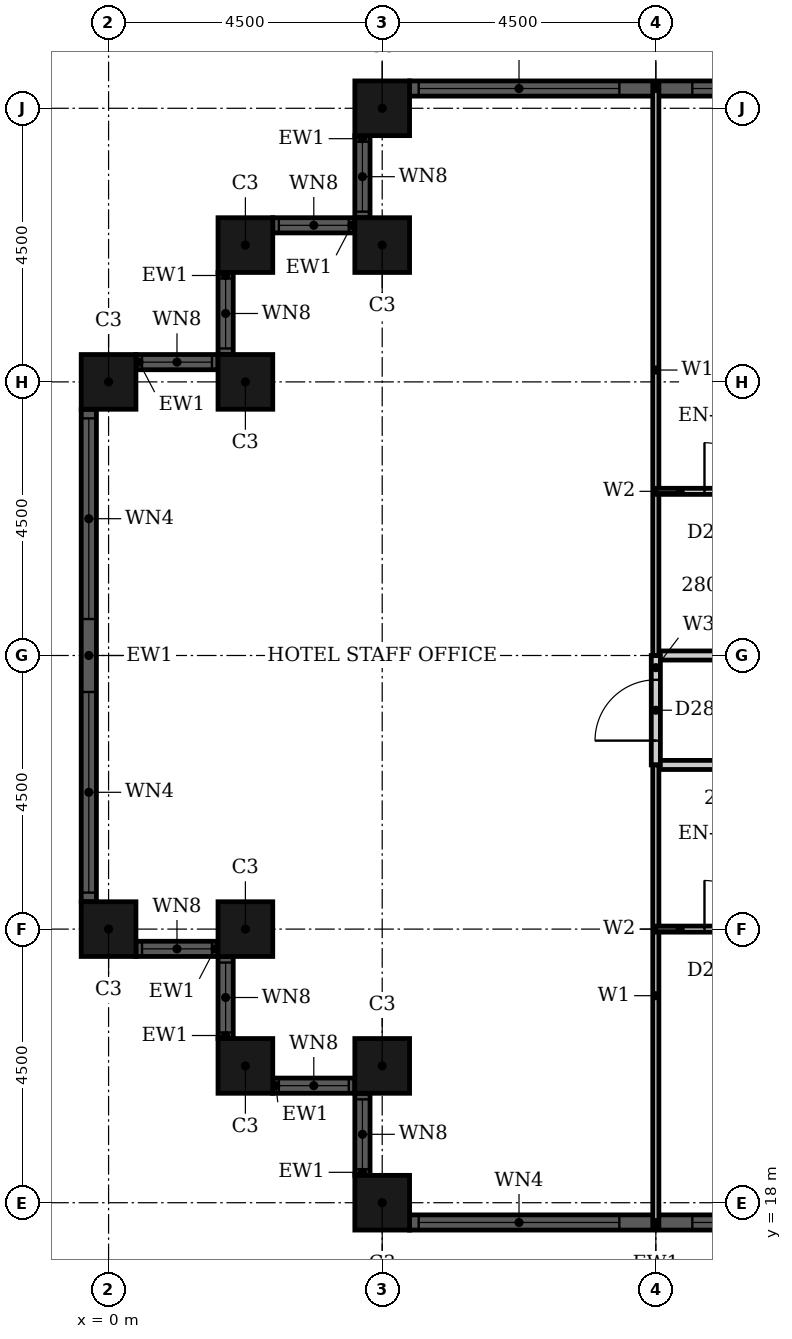
"""IFC4 building model, lengths in metres.
Left out: names, types, materials, properties, quantities, classifications, styles, units other than length and angle.
Written with IfcOpenShell. Run it as: python <this file> out.ifc"""

import sys

from ifc_helpers import new_model, si_unit, direction, frame, frame_2d, origin, origin_2d, place, context, subcontext, project, spatial, rectangle, hollow_rectangle, extrude, element, fill, save


model = new_model("IFC4")
c1 = context("Model", 3, precision=1e-05, world=origin(), true_north=direction((0.0, 1.0)))
c2 = subcontext(c1, "Body", "Model", "MODEL_VIEW")
j1 = project(units=[si_unit("LENGTHUNIT", "METRE"), si_unit("PLANEANGLEUNIT", "RADIAN")], contexts=[c1])
p1 = place(None, origin())
s1 = spatial("IfcSite", under=j1, at=p1, CompositionType="ELEMENT")
p2 = place(p1, origin())
s2 = spatial("IfcBuilding", under=s1, at=p2, CompositionType="ELEMENT")
p3 = place(p2, frame((0.0, 0.0, 115.2)))
s3 = spatial("IfcBuildingStorey", under=s2, at=p3, CompositionType="ELEMENT", Elevation=115.2)
for number, where, z_axis, x_axis in (
    (1, (4.5, 36.0, 0.0), (0.0, 0.0, 1.0), (1.0, 0.0, 0.0)),
    (2, (4.5, 33.75, 0.0), (0.0, 0.0, 1.0), (1.0, 0.0, 0.0)),
    (3, (2.25, 33.75, 0.0), (0.0, 0.0, 1.0), (1.0, 0.0, 0.0)),
    (4, (2.25, 31.5, 0.0), (0.0, 0.0, 1.0), (1.0, 0.0, 0.0)),
    (5, (0.0, 31.5, 0.0), (0.0, 0.0, 1.0), (1.0, 0.0, 0.0)),
    (6, (0.0, 22.5, 0.0), (0.0, 0.0, 1.0), (1.0, 0.0, 0.0)),
    (7, (2.25, 22.5, 0.0), (0.0, 0.0, 1.0), (1.0, 0.0, 0.0)),
    (8, (2.25, 20.25, 0.0), (0.0, 0.0, 1.0), (1.0, 0.0, 0.0)),
    (9, (4.5, 20.25, 0.0), (0.0, 0.0, 1.0), (1.0, 0.0, 0.0)),
    (10, (4.5, 18.0, 0.0), (0.0, 0.0, 1.0), (1.0, 0.0, 0.0)),
):
    element("IfcColumn", number, at=place(p3, frame(where, z_axis=z_axis, x_axis=x_axis)), inside=s3, PredefinedType="COLUMN", context=c2, shape_type="SweptSolid", body=[
        extrude(hollow_rectangle(XDim=0.9, YDim=0.9, WallThickness=0.028, at=origin_2d()), origin(), (0.0, 0.0, 1.0), 3.6),
    ])
p4 = place(p3, frame((13.05, 36.325, 0.0), z_axis=(0.0, 0.0, 1.0), x_axis=(-1.0, 0.0, 0.0)))
e11 = element("IfcWall", 11, at=p4, inside=s3, PredefinedType="SOLIDWALL", context=c2, shape_type="SweptSolid", body=[
    extrude(rectangle(XDim=8.1, YDim=0.25, at=frame_2d((4.05, 0.0))), origin(), (0.0, 0.0, 1.0), 3.6),
])
p5 = place(p4, frame((0.15, 0.0, 0.9)))
e12 = element("IfcOpeningElement", 12, at=p5, cuts=e11, PredefinedType="OPENING", context=c2, shape_type="SweptSolid", body=[
    extrude(rectangle(XDim=3.3, YDim=2.08, at=frame_2d((1.65, 1.04))), frame((0.0, 0.135, 0.0), z_axis=(0.0, -1.0, 0.0), x_axis=(1.0, 0.0, 0.0)), (0.0, 0.0, 1.0), 0.27),
])
p6 = place(p4, frame((4.65, 0.0, 0.9)))
e13 = element("IfcOpeningElement", 13, at=p6, cuts=e11, PredefinedType="OPENING", context=c2, shape_type="SweptSolid", body=[
    extrude(rectangle(XDim=3.3, YDim=2.08, at=frame_2d((1.65, 1.04))), frame((0.0, 0.135, 0.0), z_axis=(0.0, -1.0, 0.0), x_axis=(1.0, 0.0, 0.0)), (0.0, 0.0, 1.0), 0.27),
])
p7 = place(p3, frame((4.175, 35.55, 0.0), z_axis=(0.0, 0.0, 1.0), x_axis=(0.0, -1.0, 0.0)))
e14 = element("IfcWall", 14, at=p7, inside=s3, PredefinedType="SOLIDWALL", context=c2, shape_type="SweptSolid", body=[
    extrude(rectangle(XDim=1.35, YDim=0.25, at=frame_2d((0.675, 0.0))), origin(), (0.0, 0.0, 1.0), 3.6),
])
p8 = place(p7, frame((0.1, 0.0, 0.9)))
e15 = element("IfcOpeningElement", 15, at=p8, cuts=e14, PredefinedType="OPENING", context=c2, shape_type="SweptSolid", body=[
    extrude(rectangle(XDim=1.15, YDim=2.08, at=frame_2d((0.575, 1.04))), frame((0.0, 0.135, 0.0), z_axis=(0.0, -1.0, 0.0), x_axis=(1.0, 0.0, 0.0)), (0.0, 0.0, 1.0), 0.27),
])
p9 = place(p3, frame((4.05, 34.075, 0.0), z_axis=(0.0, 0.0, 1.0), x_axis=(-1.0, 0.0, 0.0)))
e16 = element("IfcWall", 16, at=p9, inside=s3, PredefinedType="SOLIDWALL", context=c2, shape_type="SweptSolid", body=[
    extrude(rectangle(XDim=1.35, YDim=0.25, at=frame_2d((0.675, 0.0))), origin(), (0.0, 0.0, 1.0), 3.6),
])
p10 = place(p9, frame((0.1, 0.0, 0.9)))
e17 = element("IfcOpeningElement", 17, at=p10, cuts=e16, PredefinedType="OPENING", context=c2, shape_type="SweptSolid", body=[
    extrude(rectangle(XDim=1.15, YDim=2.08, at=frame_2d((0.575, 1.04))), frame((0.0, 0.135, 0.0), z_axis=(0.0, -1.0, 0.0), x_axis=(1.0, 0.0, 0.0)), (0.0, 0.0, 1.0), 0.27),
])
p11 = place(p3, frame((1.925, 33.3, 0.0), z_axis=(0.0, 0.0, 1.0), x_axis=(0.0, -1.0, 0.0)))
e18 = element("IfcWall", 18, at=p11, inside=s3, PredefinedType="SOLIDWALL", context=c2, shape_type="SweptSolid", body=[
    extrude(rectangle(XDim=1.35, YDim=0.25, at=frame_2d((0.675, 0.0))), origin(), (0.0, 0.0, 1.0), 3.6),
])
p12 = place(p11, frame((0.1, 0.0, 0.9)))
e19 = element("IfcOpeningElement", 19, at=p12, cuts=e18, PredefinedType="OPENING", context=c2, shape_type="SweptSolid", body=[
    extrude(rectangle(XDim=1.15, YDim=2.08, at=frame_2d((0.575, 1.04))), frame((0.0, 0.135, 0.0), z_axis=(0.0, -1.0, 0.0), x_axis=(1.0, 0.0, 0.0)), (0.0, 0.0, 1.0), 0.27),
])
p13 = place(p3, frame((1.8, 31.825, 0.0), z_axis=(0.0, 0.0, 1.0), x_axis=(-1.0, 0.0, 0.0)))
e20 = element("IfcWall", 20, at=p13, inside=s3, PredefinedType="SOLIDWALL", context=c2, shape_type="SweptSolid", body=[
    extrude(rectangle(XDim=1.35, YDim=0.25, at=frame_2d((0.675, 0.0))), origin(), (0.0, 0.0, 1.0), 3.6),
])
p14 = place(p13, frame((0.1, 0.0, 0.9)))
e21 = element("IfcOpeningElement", 21, at=p14, cuts=e20, PredefinedType="OPENING", context=c2, shape_type="SweptSolid", body=[
    extrude(rectangle(XDim=1.15, YDim=2.08, at=frame_2d((0.575, 1.04))), frame((0.0, 0.135, 0.0), z_axis=(0.0, -1.0, 0.0), x_axis=(1.0, 0.0, 0.0)), (0.0, 0.0, 1.0), 0.27),
])
p15 = place(p3, frame((-0.325, 31.05, 0.0), z_axis=(0.0, 0.0, 1.0), x_axis=(0.0, -1.0, 0.0)))
e22 = element("IfcWall", 22, at=p15, inside=s3, PredefinedType="SOLIDWALL", context=c2, shape_type="SweptSolid", body=[
    extrude(rectangle(XDim=8.1, YDim=0.25, at=frame_2d((4.05, 0.0))), origin(), (0.0, 0.0, 1.0), 3.6),
])
p16 = place(p15, frame((0.15, 0.0, 0.9)))
e23 = element("IfcOpeningElement", 23, at=p16, cuts=e22, PredefinedType="OPENING", context=c2, shape_type="SweptSolid", body=[
    extrude(rectangle(XDim=3.3, YDim=2.08, at=frame_2d((1.65, 1.04))), frame((0.0, 0.135, 0.0), z_axis=(0.0, -1.0, 0.0), x_axis=(1.0, 0.0, 0.0)), (0.0, 0.0, 1.0), 0.27),
])
p17 = place(p15, frame((4.65, 0.0, 0.9)))
e24 = element("IfcOpeningElement", 24, at=p17, cuts=e22, PredefinedType="OPENING", context=c2, shape_type="SweptSolid", body=[
    extrude(rectangle(XDim=3.3, YDim=2.08, at=frame_2d((1.65, 1.04))), frame((0.0, 0.135, 0.0), z_axis=(0.0, -1.0, 0.0), x_axis=(1.0, 0.0, 0.0)), (0.0, 0.0, 1.0), 0.27),
])
p18 = place(p3, frame((0.45, 22.175, 0.0), z_axis=(0.0, 0.0, 1.0), x_axis=(1.0, 0.0, 0.0)))
e25 = element("IfcWall", 25, at=p18, inside=s3, PredefinedType="SOLIDWALL", context=c2, shape_type="SweptSolid", body=[
    extrude(rectangle(XDim=1.35, YDim=0.25, at=frame_2d((0.675, 0.0))), origin(), (0.0, 0.0, 1.0), 3.6),
])
p19 = place(p18, frame((0.1, 0.0, 0.9)))
e26 = element("IfcOpeningElement", 26, at=p19, cuts=e25, PredefinedType="OPENING", context=c2, shape_type="SweptSolid", body=[
    extrude(rectangle(XDim=1.15, YDim=2.08, at=frame_2d((0.575, 1.04))), frame((0.0, 0.135, 0.0), z_axis=(0.0, -1.0, 0.0), x_axis=(1.0, 0.0, 0.0)), (0.0, 0.0, 1.0), 0.27),
])
p20 = place(p3, frame((1.925, 22.05, 0.0), z_axis=(0.0, 0.0, 1.0), x_axis=(0.0, -1.0, 0.0)))
e27 = element("IfcWall", 27, at=p20, inside=s3, PredefinedType="SOLIDWALL", context=c2, shape_type="SweptSolid", body=[
    extrude(rectangle(XDim=1.35, YDim=0.25, at=frame_2d((0.675, 0.0))), origin(), (0.0, 0.0, 1.0), 3.6),
])
p21 = place(p20, frame((0.1, 0.0, 0.9)))
e28 = element("IfcOpeningElement", 28, at=p21, cuts=e27, PredefinedType="OPENING", context=c2, shape_type="SweptSolid", body=[
    extrude(rectangle(XDim=1.15, YDim=2.08, at=frame_2d((0.575, 1.04))), frame((0.0, 0.135, 0.0), z_axis=(0.0, -1.0, 0.0), x_axis=(1.0, 0.0, 0.0)), (0.0, 0.0, 1.0), 0.27),
])
p22 = place(p3, frame((2.7, 19.925, 0.0), z_axis=(0.0, 0.0, 1.0), x_axis=(1.0, 0.0, 0.0)))
e29 = element("IfcWall", 29, at=p22, inside=s3, PredefinedType="SOLIDWALL", context=c2, shape_type="SweptSolid", body=[
    extrude(rectangle(XDim=1.35, YDim=0.25, at=frame_2d((0.675, 0.0))), origin(), (0.0, 0.0, 1.0), 3.6),
])
p23 = place(p22, frame((0.1, 0.0, 0.9)))
e30 = element("IfcOpeningElement", 30, at=p23, cuts=e29, PredefinedType="OPENING", context=c2, shape_type="SweptSolid", body=[
    extrude(rectangle(XDim=1.15, YDim=2.08, at=frame_2d((0.575, 1.04))), frame((0.0, 0.135, 0.0), z_axis=(0.0, -1.0, 0.0), x_axis=(1.0, 0.0, 0.0)), (0.0, 0.0, 1.0), 0.27),
])
p24 = place(p3, frame((4.175, 19.8, 0.0), z_axis=(0.0, 0.0, 1.0), x_axis=(0.0, -1.0, 0.0)))
e31 = element("IfcWall", 31, at=p24, inside=s3, PredefinedType="SOLIDWALL", context=c2, shape_type="SweptSolid", body=[
    extrude(rectangle(XDim=1.35, YDim=0.25, at=frame_2d((0.675, 0.0))), origin(), (0.0, 0.0, 1.0), 3.6),
])
p25 = place(p24, frame((0.1, 0.0, 0.9)))
e32 = element("IfcOpeningElement", 32, at=p25, cuts=e31, PredefinedType="OPENING", context=c2, shape_type="SweptSolid", body=[
    extrude(rectangle(XDim=1.15, YDim=2.08, at=frame_2d((0.575, 1.04))), frame((0.0, 0.135, 0.0), z_axis=(0.0, -1.0, 0.0), x_axis=(1.0, 0.0, 0.0)), (0.0, 0.0, 1.0), 0.27),
])
p26 = place(p3, frame((4.95, 17.675, 0.0), z_axis=(0.0, 0.0, 1.0), x_axis=(1.0, 0.0, 0.0)))
e33 = element("IfcWall", 33, at=p26, inside=s3, PredefinedType="SOLIDWALL", context=c2, shape_type="SweptSolid", body=[
    extrude(rectangle(XDim=8.1, YDim=0.25, at=frame_2d((4.05, 0.0))), origin(), (0.0, 0.0, 1.0), 3.6),
])
p27 = place(p26, frame((0.15, 0.0, 0.9)))
e34 = element("IfcOpeningElement", 34, at=p27, cuts=e33, PredefinedType="OPENING", context=c2, shape_type="SweptSolid", body=[
    extrude(rectangle(XDim=3.3, YDim=2.08, at=frame_2d((1.65, 1.04))), frame((0.0, 0.135, 0.0), z_axis=(0.0, -1.0, 0.0), x_axis=(1.0, 0.0, 0.0)), (0.0, 0.0, 1.0), 0.27),
])
p28 = place(p26, frame((4.65, 0.0, 0.9)))
e35 = element("IfcOpeningElement", 35, at=p28, cuts=e33, PredefinedType="OPENING", context=c2, shape_type="SweptSolid", body=[
    extrude(rectangle(XDim=3.3, YDim=2.08, at=frame_2d((1.65, 1.04))), frame((0.0, 0.135, 0.0), z_axis=(0.0, -1.0, 0.0), x_axis=(1.0, 0.0, 0.0)), (0.0, 0.0, 1.0), 0.27),
])
p29 = place(p3, frame((9.0, 25.2, 0.0), z_axis=(0.0, 0.0, 1.0), x_axis=(1.0, 0.0, 0.0)))
e36 = element("IfcWall", 36, at=p29, inside=s3, PredefinedType="PARTITIONING", context=c2, shape_type="SweptSolid", body=[
    extrude(rectangle(XDim=7.2, YDim=0.15, at=frame_2d((3.6, 0.0))), origin(), (0.0, 0.0, 1.0), 3.3),
])
p30 = place(p29, frame((2.95, 0.0, 0.0)))
e37 = element("IfcOpeningElement", 37, at=p30, cuts=e36, PredefinedType="OPENING", context=c2, shape_type="SweptSolid", body=[
    extrude(rectangle(XDim=1.0, YDim=2.1, at=frame_2d((0.5, 1.05))), frame((0.0, 0.085, 0.0), z_axis=(0.0, -1.0, 0.0), x_axis=(1.0, 0.0, 0.0)), (0.0, 0.0, 1.0), 0.17),
])
p31 = place(p3, frame((9.0, 27.0, 0.0), z_axis=(0.0, 0.0, 1.0), x_axis=(1.0, 0.0, 0.0)))
e38 = element("IfcWall", 38, at=p31, inside=s3, PredefinedType="PARTITIONING", context=c2, shape_type="SweptSolid", body=[
    extrude(rectangle(XDim=7.2, YDim=0.15, at=frame_2d((3.6, 0.0))), origin(), (0.0, 0.0, 1.0), 2.58),
])
p32 = place(p31, frame((2.95, 0.0, 0.0)))
e39 = element("IfcOpeningElement", 39, at=p32, cuts=e38, PredefinedType="OPENING", context=c2, shape_type="SweptSolid", body=[
    extrude(rectangle(XDim=1.0, YDim=2.1, at=frame_2d((0.5, 1.05))), frame((0.0, 0.085, 0.0), z_axis=(0.0, -1.0, 0.0), x_axis=(1.0, 0.0, 0.0)), (0.0, 0.0, 1.0), 0.17),
])
p33 = place(p3, frame((9.0, 25.2, 0.0), z_axis=(0.0, 0.0, 1.0), x_axis=(0.0, 1.0, 0.0)))
e40 = element("IfcWall", 40, at=p33, inside=s3, PredefinedType="PARTITIONING", context=c2, shape_type="SweptSolid", body=[
    extrude(rectangle(XDim=1.8, YDim=0.15, at=frame_2d((0.9, 0.0))), origin(), (0.0, 0.0, 1.0), 3.3),
])
p34 = place(p33, frame((0.4, 0.0, 0.0)))
e41 = element("IfcOpeningElement", 41, at=p34, cuts=e40, PredefinedType="OPENING", context=c2, shape_type="SweptSolid", body=[
    extrude(rectangle(XDim=1.0, YDim=2.1, at=frame_2d((0.5, 1.05))), frame((0.0, 0.085, 0.0), z_axis=(0.0, -1.0, 0.0), x_axis=(1.0, 0.0, 0.0)), (0.0, 0.0, 1.0), 0.17),
])
p35 = place(p3, frame((9.0, 27.0, 0.0), z_axis=(0.0, 0.0, 1.0), x_axis=(0.0, 1.0, 0.0)))
e42 = element("IfcWall", 42, at=p35, inside=s3, PredefinedType="PARTITIONING", context=c2, shape_type="SweptSolid", body=[
    extrude(rectangle(XDim=9.39, YDim=0.1, at=frame_2d((4.695, 0.0))), origin(), (0.0, 0.0, 1.0), 3.3),
])
p36 = place(p3, frame((9.0, 17.61, 0.0), z_axis=(0.0, 0.0, 1.0), x_axis=(0.0, 1.0, 0.0)))
e43 = element("IfcWall", 43, at=p36, inside=s3, PredefinedType="PARTITIONING", context=c2, shape_type="SweptSolid", body=[
    extrude(rectangle(XDim=7.59, YDim=0.1, at=frame_2d((3.795, 0.0))), origin(), (0.0, 0.0, 1.0), 3.3),
])
p37 = place(p3, frame((9.0, 22.5, 0.0), z_axis=(0.0, 0.0, 1.0), x_axis=(1.0, 0.0, 0.0)))
e44 = element("IfcWall", 44, at=p37, inside=s3, PredefinedType="PARTITIONING", context=c2, shape_type="SweptSolid", body=[
    extrude(rectangle(XDim=2.4, YDim=0.1, at=frame_2d((1.2, 0.0))), origin(), (0.0, 0.0, 1.0), 2.58),
])
p38 = place(p37, frame((0.8, 0.0, 0.0)))
e45 = element("IfcOpeningElement", 45, at=p38, cuts=e44, PredefinedType="OPENING", context=c2, shape_type="SweptSolid", body=[
    extrude(rectangle(XDim=0.8, YDim=2.1, at=frame_2d((0.4, 1.05))), frame((0.0, 0.06, 0.0), z_axis=(0.0, -1.0, 0.0), x_axis=(1.0, 0.0, 0.0)), (0.0, 0.0, 1.0), 0.12),
])
p39 = place(p3, frame((9.0, 29.7, 0.0), z_axis=(0.0, 0.0, 1.0), x_axis=(1.0, 0.0, 0.0)))
e46 = element("IfcWall", 46, at=p39, inside=s3, PredefinedType="PARTITIONING", context=c2, shape_type="SweptSolid", body=[
    extrude(rectangle(XDim=2.4, YDim=0.1, at=frame_2d((1.2, 0.0))), origin(), (0.0, 0.0, 1.0), 3.3),
])
p40 = place(p39, frame((0.8, 0.0, 0.0)))
e47 = element("IfcOpeningElement", 47, at=p40, cuts=e46, PredefinedType="OPENING", context=c2, shape_type="SweptSolid", body=[
    extrude(rectangle(XDim=0.8, YDim=2.1, at=frame_2d((0.4, 1.05))), frame((0.0, 0.06, 0.0), z_axis=(0.0, -1.0, 0.0), x_axis=(1.0, 0.0, 0.0)), (0.0, 0.0, 1.0), 0.12),
])
p41 = place(p5, origin())
e48 = element("IfcWindow", 48, at=p41, inside=s3, PartitioningType="SINGLE_PANEL", PredefinedType="WINDOW", context=c2, shape_type="SweptSolid", body=[
    extrude(rectangle(XDim=3.3, YDim=2.08, at=frame_2d((1.65, 1.04))), frame((0.0, 0.03, 0.0), z_axis=(0.0, -1.0, 0.0), x_axis=(1.0, 0.0, 0.0)), (0.0, 0.0, 1.0), 0.06),
])
fill(e12, e48)
p42 = place(p6, origin())
e49 = element("IfcWindow", 49, at=p42, inside=s3, PartitioningType="SINGLE_PANEL", PredefinedType="WINDOW", context=c2, shape_type="SweptSolid", body=[
    extrude(rectangle(XDim=3.3, YDim=2.08, at=frame_2d((1.65, 1.04))), frame((0.0, 0.03, 0.0), z_axis=(0.0, -1.0, 0.0), x_axis=(1.0, 0.0, 0.0)), (0.0, 0.0, 1.0), 0.06),
])
fill(e13, e49)
p43 = place(p8, origin())
e50 = element("IfcWindow", 50, at=p43, inside=s3, PartitioningType="SINGLE_PANEL", PredefinedType="WINDOW", context=c2, shape_type="SweptSolid", body=[
    extrude(rectangle(XDim=1.15, YDim=2.08, at=frame_2d((0.575, 1.04))), frame((0.0, 0.03, 0.0), z_axis=(0.0, -1.0, 0.0), x_axis=(1.0, 0.0, 0.0)), (0.0, 0.0, 1.0), 0.06),
])
fill(e15, e50)
p44 = place(p10, origin())
e51 = element("IfcWindow", 51, at=p44, inside=s3, PartitioningType="SINGLE_PANEL", PredefinedType="WINDOW", context=c2, shape_type="SweptSolid", body=[
    extrude(rectangle(XDim=1.15, YDim=2.08, at=frame_2d((0.575, 1.04))), frame((0.0, 0.03, 0.0), z_axis=(0.0, -1.0, 0.0), x_axis=(1.0, 0.0, 0.0)), (0.0, 0.0, 1.0), 0.06),
])
fill(e17, e51)
p45 = place(p12, origin())
e52 = element("IfcWindow", 52, at=p45, inside=s3, PartitioningType="SINGLE_PANEL", PredefinedType="WINDOW", context=c2, shape_type="SweptSolid", body=[
    extrude(rectangle(XDim=1.15, YDim=2.08, at=frame_2d((0.575, 1.04))), frame((0.0, 0.03, 0.0), z_axis=(0.0, -1.0, 0.0), x_axis=(1.0, 0.0, 0.0)), (0.0, 0.0, 1.0), 0.06),
])
fill(e19, e52)
p46 = place(p14, origin())
e53 = element("IfcWindow", 53, at=p46, inside=s3, PartitioningType="SINGLE_PANEL", PredefinedType="WINDOW", context=c2, shape_type="SweptSolid", body=[
    extrude(rectangle(XDim=1.15, YDim=2.08, at=frame_2d((0.575, 1.04))), frame((0.0, 0.03, 0.0), z_axis=(0.0, -1.0, 0.0), x_axis=(1.0, 0.0, 0.0)), (0.0, 0.0, 1.0), 0.06),
])
fill(e21, e53)
p47 = place(p16, origin())
e54 = element("IfcWindow", 54, at=p47, inside=s3, PartitioningType="SINGLE_PANEL", PredefinedType="WINDOW", context=c2, shape_type="SweptSolid", body=[
    extrude(rectangle(XDim=3.3, YDim=2.08, at=frame_2d((1.65, 1.04))), frame((0.0, 0.03, 0.0), z_axis=(0.0, -1.0, 0.0), x_axis=(1.0, 0.0, 0.0)), (0.0, 0.0, 1.0), 0.06),
])
fill(e23, e54)
p48 = place(p17, origin())
e55 = element("IfcWindow", 55, at=p48, inside=s3, PartitioningType="SINGLE_PANEL", PredefinedType="WINDOW", context=c2, shape_type="SweptSolid", body=[
    extrude(rectangle(XDim=3.3, YDim=2.08, at=frame_2d((1.65, 1.04))), frame((0.0, 0.03, 0.0), z_axis=(0.0, -1.0, 0.0), x_axis=(1.0, 0.0, 0.0)), (0.0, 0.0, 1.0), 0.06),
])
fill(e24, e55)
p49 = place(p19, origin())
e56 = element("IfcWindow", 56, at=p49, inside=s3, PartitioningType="SINGLE_PANEL", PredefinedType="WINDOW", context=c2, shape_type="SweptSolid", body=[
    extrude(rectangle(XDim=1.15, YDim=2.08, at=frame_2d((0.575, 1.04))), frame((0.0, 0.03, 0.0), z_axis=(0.0, -1.0, 0.0), x_axis=(1.0, 0.0, 0.0)), (0.0, 0.0, 1.0), 0.06),
])
fill(e26, e56)
p50 = place(p21, origin())
e57 = element("IfcWindow", 57, at=p50, inside=s3, PartitioningType="SINGLE_PANEL", PredefinedType="WINDOW", context=c2, shape_type="SweptSolid", body=[
    extrude(rectangle(XDim=1.15, YDim=2.08, at=frame_2d((0.575, 1.04))), frame((0.0, 0.03, 0.0), z_axis=(0.0, -1.0, 0.0), x_axis=(1.0, 0.0, 0.0)), (0.0, 0.0, 1.0), 0.06),
])
fill(e28, e57)
p51 = place(p23, origin())
e58 = element("IfcWindow", 58, at=p51, inside=s3, PartitioningType="SINGLE_PANEL", PredefinedType="WINDOW", context=c2, shape_type="SweptSolid", body=[
    extrude(rectangle(XDim=1.15, YDim=2.08, at=frame_2d((0.575, 1.04))), frame((0.0, 0.03, 0.0), z_axis=(0.0, -1.0, 0.0), x_axis=(1.0, 0.0, 0.0)), (0.0, 0.0, 1.0), 0.06),
])
fill(e30, e58)
p52 = place(p25, origin())
e59 = element("IfcWindow", 59, at=p52, inside=s3, PartitioningType="SINGLE_PANEL", PredefinedType="WINDOW", context=c2, shape_type="SweptSolid", body=[
    extrude(rectangle(XDim=1.15, YDim=2.08, at=frame_2d((0.575, 1.04))), frame((0.0, 0.03, 0.0), z_axis=(0.0, -1.0, 0.0), x_axis=(1.0, 0.0, 0.0)), (0.0, 0.0, 1.0), 0.06),
])
fill(e32, e59)
p53 = place(p27, origin())
e60 = element("IfcWindow", 60, at=p53, inside=s3, PartitioningType="SINGLE_PANEL", PredefinedType="WINDOW", context=c2, shape_type="SweptSolid", body=[
    extrude(rectangle(XDim=3.3, YDim=2.08, at=frame_2d((1.65, 1.04))), frame((0.0, 0.03, 0.0), z_axis=(0.0, -1.0, 0.0), x_axis=(1.0, 0.0, 0.0)), (0.0, 0.0, 1.0), 0.06),
])
fill(e34, e60)
p54 = place(p28, origin())
e61 = element("IfcWindow", 61, at=p54, inside=s3, PartitioningType="SINGLE_PANEL", PredefinedType="WINDOW", context=c2, shape_type="SweptSolid", body=[
    extrude(rectangle(XDim=3.3, YDim=2.08, at=frame_2d((1.65, 1.04))), frame((0.0, 0.03, 0.0), z_axis=(0.0, -1.0, 0.0), x_axis=(1.0, 0.0, 0.0)), (0.0, 0.0, 1.0), 0.06),
])
fill(e35, e61)
p55 = place(p38, origin())
e62 = element("IfcDoor", 62, at=p55, inside=s3, OperationType="SINGLE_SWING_RIGHT", PredefinedType="DOOR", context=c2, shape_type="SweptSolid", body=[
    extrude(rectangle(XDim=0.8, YDim=2.1, at=frame_2d((0.4, 1.05))), frame((0.0, 0.025, 0.0), z_axis=(0.0, -1.0, 0.0), x_axis=(1.0, 0.0, 0.0)), (0.0, 0.0, 1.0), 0.05),
])
fill(e45, e62)
p56 = place(p40, origin())
e63 = element("IfcDoor", 63, at=p56, inside=s3, OperationType="SINGLE_SWING_LEFT", PredefinedType="DOOR", context=c2, shape_type="SweptSolid", body=[
    extrude(rectangle(XDim=0.8, YDim=2.1, at=frame_2d((0.4, 1.05))), frame((0.0, 0.025, 0.0), z_axis=(0.0, -1.0, 0.0), x_axis=(1.0, 0.0, 0.0)), (0.0, 0.0, 1.0), 0.05),
])
fill(e47, e63)
p57 = place(p34, origin())
e64 = element("IfcDoor", 64, at=p57, inside=s3, OperationType="SINGLE_SWING_LEFT", PredefinedType="DOOR", context=c2, shape_type="SweptSolid", body=[
    extrude(rectangle(XDim=1.0, YDim=2.1, at=frame_2d((0.5, 1.05))), frame((0.0, 0.025, 0.0), z_axis=(0.0, -1.0, 0.0), x_axis=(1.0, 0.0, 0.0)), (0.0, 0.0, 1.0), 0.05),
])
fill(e41, e64)
save(model, sys.argv[1])
